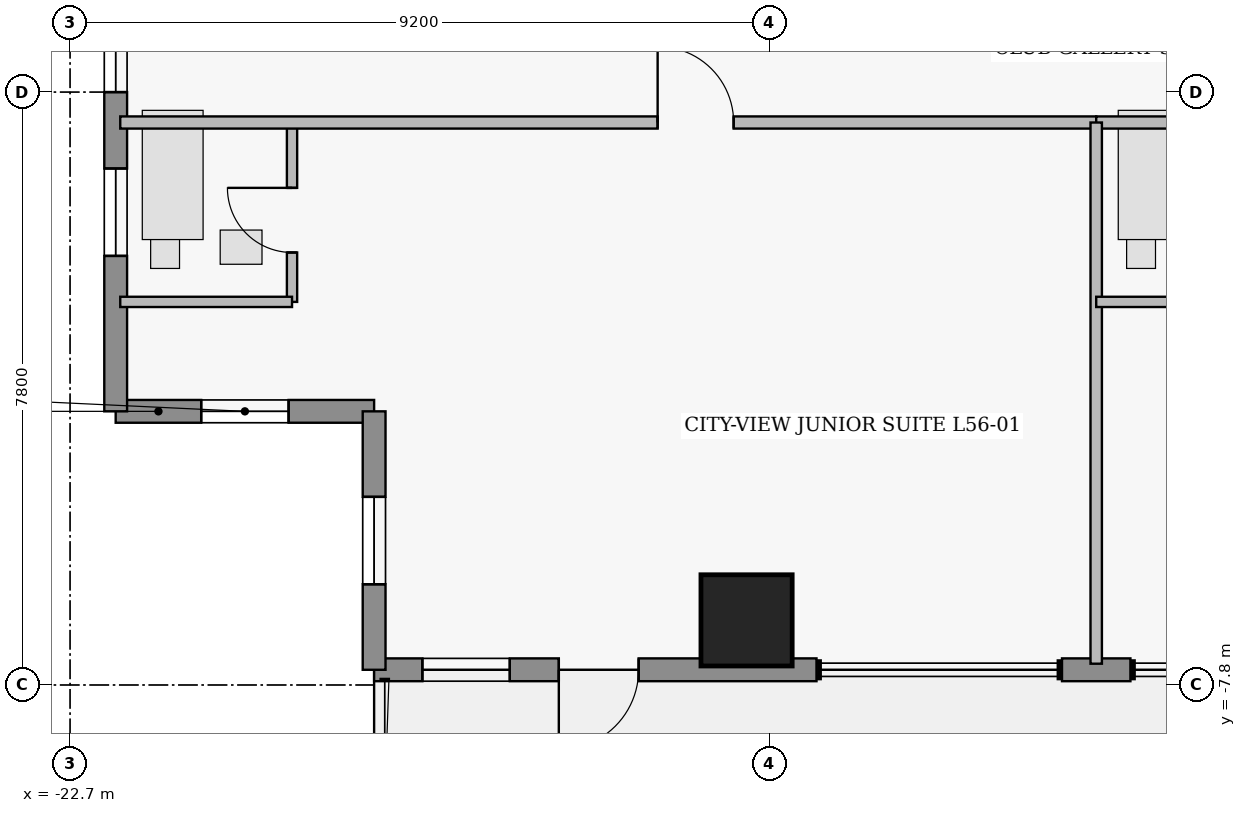
"""IFC4 building model, lengths in metres.
Left out: names, types, materials, properties, quantities, classifications, styles, units other than length and angle.
Written with IfcOpenShell. Run it as: python <this file> out.ifc"""

import sys

from ifc_helpers import new_model, si_unit, direction, frame, frame_2d, origin, origin_2d, place, context, subcontext, project, spatial, rectangle, extrude, element, fill, save


model = new_model("IFC4")
c1 = context("Model", 3, precision=1e-05, world=origin(), true_north=direction((0.0, 1.0)))
c2 = subcontext(c1, "Body", "Model", "MODEL_VIEW")
j1 = project(units=[si_unit("LENGTHUNIT", "METRE"), si_unit("PLANEANGLEUNIT", "RADIAN")], contexts=[c1])
p1 = place(None, origin())
s1 = spatial("IfcSite", under=j1, at=p1, CompositionType="ELEMENT")
p2 = place(p1, origin())
s2 = spatial("IfcBuilding", under=s1, at=p2, CompositionType="ELEMENT")
p3 = place(p2, frame((0.0, 0.0, 222.4)))
s3 = spatial("IfcBuildingStorey", under=s2, at=p3, CompositionType="ELEMENT", Elevation=222.4)
p4 = place(p3, frame((-13.8, -6.95, 0.0), z_axis=(0.0, 0.0, 1.0), x_axis=(1.0, 0.0, 0.0)))
e1 = element("IfcColumn", 1, at=p4, inside=s3, PredefinedType="COLUMN", context=c2, shape_type="SweptSolid", body=[
    extrude(rectangle(XDim=1.2, YDim=1.2, at=origin_2d()), origin(), (0.0, 0.0, 1.0), 3.75),
])
p5 = place(p3, frame((-18.7, -4.2, 0.0), z_axis=(0.0, 0.0, 1.0), x_axis=(-1.0, 0.0, 0.0)))
e2 = element("IfcWall", 2, at=p5, inside=s3, PredefinedType="STANDARD", context=c2, shape_type="SweptSolid", body=[
    extrude(rectangle(XDim=3.4, YDim=0.3, at=frame_2d((1.7, 0.0))), origin(), (0.0, 0.0, 1.0), 3.53),
])
p6 = place(p5, frame((1.125, 0.0, 1.25)))
e3 = element("IfcOpeningElement", 3, at=p6, cuts=e2, PredefinedType="OPENING", context=c2, shape_type="SweptSolid", body=[
    extrude(rectangle(XDim=1.15, YDim=1.55, at=frame_2d((0.575, 0.775))), frame((0.0, 0.16, 0.0), z_axis=(0.0, -1.0, 0.0), x_axis=(1.0, 0.0, 0.0)), (0.0, 0.0, 1.0), 0.32),
])
p7 = place(p3, frame((-22.1, -4.2, 0.0), z_axis=(0.0, 0.0, 1.0), x_axis=(0.0, 1.0, 0.0)))
e4 = element("IfcWall", 4, at=p7, inside=s3, PredefinedType="STANDARD", context=c2, shape_type="SweptSolid", body=[
    extrude(rectangle(XDim=6.2, YDim=0.3, at=frame_2d((3.1, 0.0))), origin(), (0.0, 0.0, 1.0), 3.53),
])
p8 = place(p7, frame((2.045, 0.0, 0.95)))
e5 = element("IfcOpeningElement", 5, at=p8, cuts=e4, PredefinedType="OPENING", context=c2, shape_type="SweptSolid", body=[
    extrude(rectangle(XDim=1.15, YDim=1.55, at=frame_2d((0.575, 0.775))), frame((0.0, 0.16, 0.0), z_axis=(0.0, -1.0, 0.0), x_axis=(1.0, 0.0, 0.0)), (0.0, 0.0, 1.0), 0.32),
])
p9 = place(p7, frame((4.2, 0.0, 0.95)))
e6 = element("IfcOpeningElement", 6, at=p9, cuts=e4, PredefinedType="OPENING", context=c2, shape_type="SweptSolid", body=[
    extrude(rectangle(XDim=1.15, YDim=1.55, at=frame_2d((0.575, 0.775))), frame((0.0, 0.16, 0.0), z_axis=(0.0, -1.0, 0.0), x_axis=(1.0, 0.0, 0.0)), (0.0, 0.0, 1.0), 0.32),
])
p10 = place(p3, frame((-8.75, -7.6, 0.0), z_axis=(0.0, 0.0, 1.0), x_axis=(-1.0, 0.0, 0.0)))
e7 = element("IfcWall", 7, at=p10, inside=s3, PredefinedType="STANDARD", context=c2, shape_type="SweptSolid", body=[
    extrude(rectangle(XDim=0.9, YDim=0.3, at=frame_2d((0.45, 0.0))), origin(), (0.0, 0.0, 1.0), 3.53),
])
p11 = place(p3, frame((-12.88, -7.6, 0.0), z_axis=(0.0, 0.0, 1.0), x_axis=(-1.0, 0.0, 0.0)))
e8 = element("IfcWall", 8, at=p11, inside=s3, PredefinedType="STANDARD", context=c2, shape_type="SweptSolid", body=[
    extrude(rectangle(XDim=5.82, YDim=0.3, at=frame_2d((2.91, 0.0))), origin(), (0.0, 0.0, 1.0), 3.53),
])
p12 = place(p11, frame((2.34, 0.0, 0.0)))
e9 = element("IfcOpeningElement", 9, at=p12, cuts=e8, PredefinedType="OPENING", context=c2, shape_type="SweptSolid", body=[
    extrude(rectangle(XDim=1.05, YDim=2.2, at=frame_2d((0.525, 1.1))), frame((0.0, 0.16, 0.0), z_axis=(0.0, -1.0, 0.0), x_axis=(1.0, 0.0, 0.0)), (0.0, 0.0, 1.0), 0.32),
])
p13 = place(p11, frame((4.035, 0.0, 0.95)))
e10 = element("IfcOpeningElement", 10, at=p13, cuts=e8, PredefinedType="OPENING", context=c2, shape_type="SweptSolid", body=[
    extrude(rectangle(XDim=1.15, YDim=1.55, at=frame_2d((0.575, 0.775))), frame((0.0, 0.16, 0.0), z_axis=(0.0, -1.0, 0.0), x_axis=(1.0, 0.0, 0.0)), (0.0, 0.0, 1.0), 0.32),
])
p14 = place(p3, frame((-18.7, -7.6, 0.0), z_axis=(0.0, 0.0, 1.0), x_axis=(0.0, 1.0, 0.0)))
e11 = element("IfcWall", 11, at=p14, inside=s3, PredefinedType="STANDARD", context=c2, shape_type="SweptSolid", body=[
    extrude(rectangle(XDim=3.4, YDim=0.3, at=frame_2d((1.7, 0.0))), origin(), (0.0, 0.0, 1.0), 3.53),
])
p15 = place(p14, frame((1.125, 0.0, 1.25)))
e12 = element("IfcOpeningElement", 12, at=p15, cuts=e11, PredefinedType="OPENING", context=c2, shape_type="SweptSolid", body=[
    extrude(rectangle(XDim=1.15, YDim=1.55, at=frame_2d((0.575, 0.775))), frame((0.0, 0.16, 0.0), z_axis=(0.0, -1.0, 0.0), x_axis=(1.0, 0.0, 0.0)), (0.0, 0.0, 1.0), 0.32),
])
p16 = place(p3, frame((-19.78, -2.76, 0.0), z_axis=(0.0, 0.0, 1.0), x_axis=(0.0, 1.0, 0.0)))
e13 = element("IfcWall", 13, at=p16, inside=s3, PredefinedType="PLUMBINGWALL", context=c2, shape_type="SweptSolid", body=[
    extrude(rectangle(XDim=2.36, YDim=0.135, at=frame_2d((1.18, 0.0))), origin(), (0.0, 0.0, 1.0), 3.53),
])
p17 = place(p16, frame((0.65, 0.0, 0.0)))
e14 = element("IfcOpeningElement", 14, at=p17, cuts=e13, PredefinedType="OPENING", context=c2, shape_type="SweptSolid", body=[
    extrude(rectangle(XDim=0.85, YDim=2.1, at=frame_2d((0.425, 1.05))), frame((0.0, 0.077, 0.0), z_axis=(0.0, -1.0, 0.0), x_axis=(1.0, 0.0, 0.0)), (0.0, 0.0, 1.0), 0.155),
])
p18 = place(p3, frame((-22.04, -0.4, 0.0), z_axis=(0.0, 0.0, 1.0), x_axis=(1.0, 0.0, 0.0)))
e15 = element("IfcWall", 15, at=p18, inside=s3, PredefinedType="PARTITIONING", context=c2, shape_type="SweptSolid", body=[
    extrude(rectangle(XDim=12.84, YDim=0.16, at=frame_2d((6.42, 0.0))), origin(), (0.0, 0.0, 1.0), 3.53),
])
p19 = place(p18, frame((7.07, 0.0, 0.0)))
e16 = element("IfcOpeningElement", 16, at=p19, cuts=e15, PredefinedType="OPENING", context=c2, shape_type="SweptSolid", body=[
    extrude(rectangle(XDim=1.0, YDim=2.15, at=frame_2d((0.5, 1.075))), frame((0.0, 0.09, 0.0), z_axis=(0.0, -1.0, 0.0), x_axis=(1.0, 0.0, 0.0)), (0.0, 0.0, 1.0), 0.18),
])
p20 = place(p3, frame((-9.2, -0.4, 0.0), z_axis=(0.0, 0.0, 1.0), x_axis=(1.0, 0.0, 0.0)))
e17 = element("IfcWall", 17, at=p20, inside=s3, PredefinedType="PARTITIONING", context=c2, shape_type="SweptSolid", body=[
    extrude(rectangle(XDim=9.2, YDim=0.16, at=frame_2d((4.6, 0.0))), origin(), (0.0, 0.0, 1.0), 3.53),
])
p21 = place(p20, frame((5.25, 0.0, 0.0)))
e18 = element("IfcOpeningElement", 18, at=p21, cuts=e17, PredefinedType="OPENING", context=c2, shape_type="SweptSolid", body=[
    extrude(rectangle(XDim=1.0, YDim=2.15, at=frame_2d((0.5, 1.075))), frame((0.0, 0.09, 0.0), z_axis=(0.0, -1.0, 0.0), x_axis=(1.0, 0.0, 0.0)), (0.0, 0.0, 1.0), 0.18),
])
p22 = place(p3, frame((-22.04, -2.76, 0.0), z_axis=(0.0, 0.0, 1.0), x_axis=(1.0, 0.0, 0.0)))
e19 = element("IfcWall", 19, at=p22, inside=s3, PredefinedType="PLUMBINGWALL", context=c2, shape_type="SweptSolid", body=[
    extrude(rectangle(XDim=2.26, YDim=0.135, at=frame_2d((1.13, 0.0))), origin(), (0.0, 0.0, 1.0), 3.53),
])
p23 = place(p3, frame((-9.2, -7.52, 0.0), z_axis=(0.0, 0.0, 1.0), x_axis=(0.0, 1.0, 0.0)))
e20 = element("IfcWall", 20, at=p23, inside=s3, PredefinedType="PARTITIONING", context=c2, shape_type="SweptSolid", body=[
    extrude(rectangle(XDim=7.12, YDim=0.15, at=frame_2d((3.56, 0.0))), origin(), (0.0, 0.0, 1.0), 3.53),
])
p24 = place(p3, frame((-9.2, -2.76, 0.0), z_axis=(0.0, 0.0, 1.0), x_axis=(1.0, 0.0, 0.0)))
e21 = element("IfcWall", 21, at=p24, inside=s3, PredefinedType="PLUMBINGWALL", context=c2, shape_type="SweptSolid", body=[
    extrude(rectangle(XDim=2.26, YDim=0.135, at=frame_2d((1.13, 0.0))), origin(), (0.0, 0.0, 1.0), 3.124),
])
p25 = place(p6, origin())
e22 = element("IfcWindow", 22, at=p25, inside=s3, PartitioningType="SINGLE_PANEL", PredefinedType="WINDOW", context=c2, shape_type="SweptSolid", body=[
    extrude(rectangle(XDim=1.15, YDim=1.55, at=frame_2d((0.575, 0.775))), frame((0.0, 0.03, 0.0), z_axis=(0.0, -1.0, 0.0), x_axis=(1.0, 0.0, 0.0)), (0.0, 0.0, 1.0), 0.06),
])
fill(e3, e22)
p26 = place(p8, origin())
e23 = element("IfcWindow", 23, at=p26, inside=s3, PartitioningType="SINGLE_PANEL", PredefinedType="WINDOW", context=c2, shape_type="SweptSolid", body=[
    extrude(rectangle(XDim=1.15, YDim=1.55, at=frame_2d((0.575, 0.775))), frame((0.0, 0.03, 0.0), z_axis=(0.0, -1.0, 0.0), x_axis=(1.0, 0.0, 0.0)), (0.0, 0.0, 1.0), 0.06),
])
fill(e5, e23)
p27 = place(p9, origin())
e24 = element("IfcWindow", 24, at=p27, inside=s3, PartitioningType="SINGLE_PANEL", PredefinedType="WINDOW", context=c2, shape_type="SweptSolid", body=[
    extrude(rectangle(XDim=1.15, YDim=1.55, at=frame_2d((0.575, 0.775))), frame((0.0, 0.03, 0.0), z_axis=(0.0, -1.0, 0.0), x_axis=(1.0, 0.0, 0.0)), (0.0, 0.0, 1.0), 0.06),
])
fill(e6, e24)
p28 = place(p12, origin())
e25 = element("IfcDoor", 25, at=p28, inside=s3, OperationType="SINGLE_SWING_RIGHT", PredefinedType="DOOR", context=c2, shape_type="SweptSolid", body=[
    extrude(rectangle(XDim=1.05, YDim=2.2, at=frame_2d((0.525, 1.1))), frame((0.0, 0.025, 0.0), z_axis=(0.0, -1.0, 0.0), x_axis=(1.0, 0.0, 0.0)), (0.0, 0.0, 1.0), 0.05),
])
fill(e9, e25)
p29 = place(p13, origin())
e26 = element("IfcWindow", 26, at=p29, inside=s3, PartitioningType="SINGLE_PANEL", PredefinedType="WINDOW", context=c2, shape_type="SweptSolid", body=[
    extrude(rectangle(XDim=1.15, YDim=1.55, at=frame_2d((0.575, 0.775))), frame((0.0, 0.03, 0.0), z_axis=(0.0, -1.0, 0.0), x_axis=(1.0, 0.0, 0.0)), (0.0, 0.0, 1.0), 0.06),
])
fill(e10, e26)
p30 = place(p15, origin())
e27 = element("IfcWindow", 27, at=p30, inside=s3, PartitioningType="SINGLE_PANEL", PredefinedType="WINDOW", context=c2, shape_type="SweptSolid", body=[
    extrude(rectangle(XDim=1.15, YDim=1.55, at=frame_2d((0.575, 0.775))), frame((0.0, 0.03, 0.0), z_axis=(0.0, -1.0, 0.0), x_axis=(1.0, 0.0, 0.0)), (0.0, 0.0, 1.0), 0.06),
])
fill(e12, e27)
p31 = place(p17, origin())
e28 = element("IfcDoor", 28, at=p31, inside=s3, OperationType="SINGLE_SWING_RIGHT", PredefinedType="DOOR", context=c2, shape_type="SweptSolid", body=[
    extrude(rectangle(XDim=0.85, YDim=2.1, at=frame_2d((0.425, 1.05))), frame((0.0, 0.025, 0.0), z_axis=(0.0, -1.0, 0.0), x_axis=(1.0, 0.0, 0.0)), (0.0, 0.0, 1.0), 0.05),
])
fill(e14, e28)
p32 = place(p19, origin())
e29 = element("IfcDoor", 29, at=p32, inside=s3, OperationType="SINGLE_SWING_LEFT", PredefinedType="DOOR", context=c2, shape_type="SweptSolid", body=[
    extrude(rectangle(XDim=1.0, YDim=2.15, at=frame_2d((0.5, 1.075))), frame((0.0, 0.025, 0.0), z_axis=(0.0, -1.0, 0.0), x_axis=(1.0, 0.0, 0.0)), (0.0, 0.0, 1.0), 0.05),
])
fill(e16, e29)
save(model, sys.argv[1])
